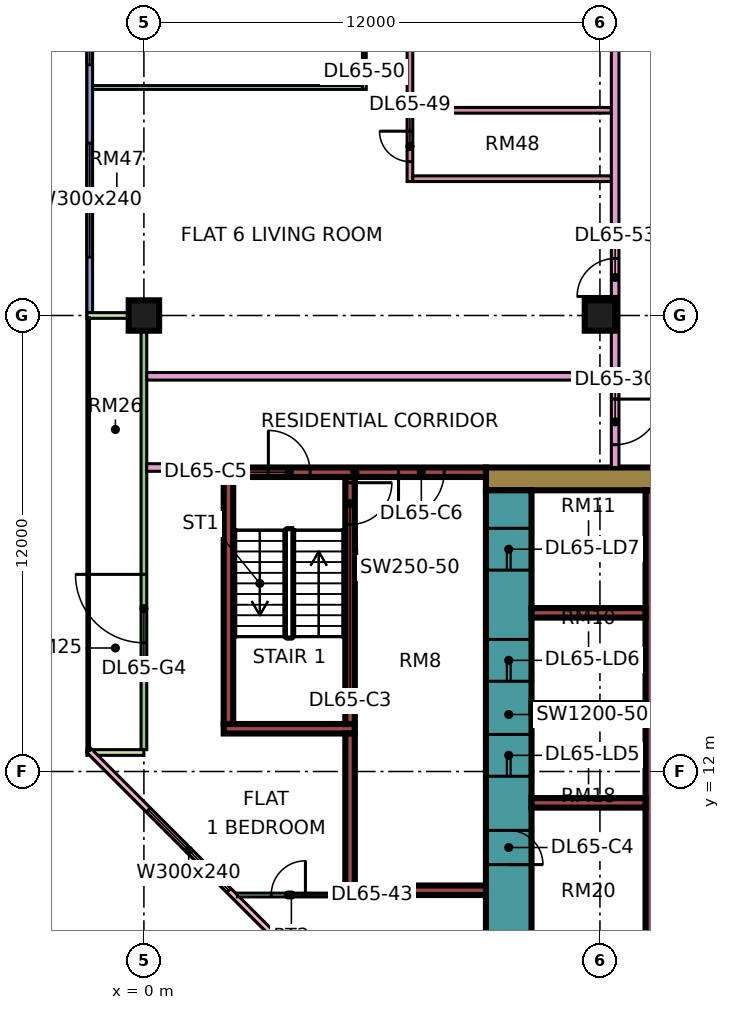
"""IFC4 building model, lengths in metres.
Left out: names, types, materials, properties, quantities, classifications, styles, units other than length and angle.
Written with IfcOpenShell. Run it as: python <this file> out.ifc"""

import sys

from ifc_helpers import new_model, si_unit, direction, frame, frame_2d, origin, origin_2d, place, context, subcontext, project, spatial, rectangle, extrude, element, fill, save


model = new_model("IFC4")
c1 = context("Model", 3, precision=1e-05, world=origin(), true_north=direction((0.0, 1.0)))
c2 = subcontext(c1, "Body", "Model", "MODEL_VIEW")
j1 = project(units=[si_unit("LENGTHUNIT", "METRE"), si_unit("PLANEANGLEUNIT", "RADIAN")], contexts=[c1])
p1 = place(None, origin())
s1 = spatial("IfcSite", under=j1, at=p1, CompositionType="ELEMENT")
p2 = place(p1, origin())
s2 = spatial("IfcBuilding", under=s1, at=p2, CompositionType="ELEMENT")
p3 = place(p2, frame((0.0, 0.0, 280.9)))
s3 = spatial("IfcBuildingStorey", under=s2, at=p3, CompositionType="ELEMENT", Elevation=280.9)
for number, where, z_axis, x_axis in (
    (1, (0.0, 24.0, 0.0), (0.0, 0.0, 1.0), (1.0, 0.0, 0.0)),
    (2, (12.0, 24.0, 0.0), (0.0, 0.0, 1.0), (1.0, 0.0, 0.0)),
):
    element("IfcColumn", number, at=place(p3, frame(where, z_axis=z_axis, x_axis=x_axis)), inside=s3, PredefinedType="COLUMN", context=c2, shape_type="SweptSolid", body=[
        extrude(rectangle(XDim=0.8, YDim=0.8, at=origin_2d()), origin(), (0.0, 0.0, 1.0), 3.75),
    ])
p4 = place(p3, frame((9.0, 19.7, 0.0), z_axis=(0.0, 0.0, 1.0), x_axis=(1.0, 0.0, 0.0)))
e3 = element("IfcWall", 3, at=p4, inside=s3, PredefinedType="SHEAR", context=c2, shape_type="SweptSolid", body=[
    extrude(rectangle(XDim=25.0, YDim=0.6, at=frame_2d((12.5, 0.0))), origin(), (0.0, 0.0, 1.0), 3.75),
])
p5 = place(p4, frame((19.1, 0.0, 0.0)))
e4 = element("IfcOpeningElement", 4, at=p5, cuts=e3, PredefinedType="OPENING", context=c2, shape_type="SweptSolid", body=[
    extrude(rectangle(XDim=1.8, YDim=2.4, at=frame_2d((0.9, 1.2))), frame((0.0, 0.31, 0.0), z_axis=(0.0, -1.0, 0.0), x_axis=(1.0, 0.0, 0.0)), (0.0, 0.0, 1.0), 0.62),
])
p6 = place(p3, frame((9.6, 7.6, 0.0), z_axis=(0.0, 0.0, 1.0), x_axis=(0.0, 1.0, 0.0)))
e5 = element("IfcWall", 5, at=p6, inside=s3, PredefinedType="SHEAR", context=c2, shape_type="SweptSolid", body=[
    extrude(rectangle(XDim=11.8, YDim=1.2, at=frame_2d((5.9, 0.0))), origin(), (0.0, 0.0, 1.0), 3.75),
])
p7 = place(p6, frame((4.275, 0.0, 0.0)))
e6 = element("IfcOpeningElement", 6, at=p7, cuts=e5, PredefinedType="OPENING", context=c2, shape_type="SweptSolid", body=[
    extrude(rectangle(XDim=1.1, YDim=2.2, at=frame_2d((0.55, 1.1))), frame((0.0, 0.61, 0.0), z_axis=(0.0, -1.0, 0.0), x_axis=(1.0, 0.0, 0.0)), (0.0, 0.0, 1.0), 1.22),
])
p8 = place(p6, frame((6.775, 0.0, 0.0)))
e7 = element("IfcOpeningElement", 7, at=p8, cuts=e5, PredefinedType="OPENING", context=c2, shape_type="SweptSolid", body=[
    extrude(rectangle(XDim=1.1, YDim=2.2, at=frame_2d((0.55, 1.1))), frame((0.0, 0.61, 0.0), z_axis=(0.0, -1.0, 0.0), x_axis=(1.0, 0.0, 0.0)), (0.0, 0.0, 1.0), 1.22),
])
p9 = place(p6, frame((9.7, 0.0, 0.0)))
e8 = element("IfcOpeningElement", 8, at=p9, cuts=e5, PredefinedType="OPENING", context=c2, shape_type="SweptSolid", body=[
    extrude(rectangle(XDim=1.1, YDim=2.2, at=frame_2d((0.55, 1.1))), frame((0.0, 0.61, 0.0), z_axis=(0.0, -1.0, 0.0), x_axis=(1.0, 0.0, 0.0)), (0.0, 0.0, 1.0), 1.22),
])
p10 = place(p6, frame((1.95, 0.0, 0.0)))
e9 = element("IfcOpeningElement", 9, at=p10, cuts=e5, PredefinedType="OPENING", context=c2, shape_type="SweptSolid", body=[
    extrude(rectangle(XDim=0.9, YDim=2.1, at=frame_2d((0.45, 1.05))), frame((0.0, 0.61, 0.0), z_axis=(0.0, -1.0, 0.0), x_axis=(1.0, 0.0, 0.0)), (0.0, 0.0, 1.0), 1.22),
])
p11 = place(p3, frame((13.325, 7.6, 0.0), z_axis=(0.0, 0.0, 1.0), x_axis=(0.0, 1.0, 0.0)))
e10 = element("IfcWall", 10, at=p11, inside=s3, PredefinedType="SHEAR", context=c2, shape_type="SweptSolid", body=[
    extrude(rectangle(XDim=11.8, YDim=0.25, at=frame_2d((5.9, 0.0))), origin(), (0.0, 0.0, 1.0), 3.75),
])
for number, where, z_axis, x_axis in (
    (11, (10.2, 11.175, 0.0), (0.0, 0.0, 1.0), (1.0, 0.0, 0.0)),
    (12, (10.2, 13.675, 0.0), (0.0, 0.0, 1.0), (1.0, 0.0, 0.0)),
    (13, (10.2, 16.175, 0.0), (0.0, 0.0, 1.0), (1.0, 0.0, 0.0)),
):
    element("IfcWall", number, at=place(p3, frame(where, z_axis=z_axis, x_axis=x_axis)), inside=s3, PredefinedType="SHEAR", context=c2, shape_type="SweptSolid", body=[
        extrude(rectangle(XDim=3.0, YDim=0.25, at=frame_2d((1.5, 0.0))), origin(), (0.0, 0.0, 1.0), 3.75),
    ])
p12 = place(p3, frame((2.1, 19.875, 0.0), z_axis=(0.0, 0.0, 1.0), x_axis=(1.0, 0.0, 0.0)))
e14 = element("IfcWall", 14, at=p12, inside=s3, PredefinedType="SHEAR", context=c2, shape_type="SweptSolid", body=[
    extrude(rectangle(XDim=6.9, YDim=0.25, at=frame_2d((3.45, 0.0))), origin(), (0.0, 0.0, 1.0), 3.75),
])
p13 = place(p12, frame((1.175, 0.0, 0.0)))
e15 = element("IfcOpeningElement", 15, at=p13, cuts=e14, PredefinedType="OPENING", context=c2, shape_type="SweptSolid", body=[
    extrude(rectangle(XDim=1.1, YDim=2.2, at=frame_2d((0.55, 1.1))), frame((0.0, 0.135, 0.0), z_axis=(0.0, -1.0, 0.0), x_axis=(1.0, 0.0, 0.0)), (0.0, 0.0, 1.0), 0.27),
])
p14 = place(p12, frame((4.6, 0.0, 0.0)))
e16 = element("IfcOpeningElement", 16, at=p14, cuts=e14, PredefinedType="OPENING", context=c2, shape_type="SweptSolid", body=[
    extrude(rectangle(XDim=1.2, YDim=2.2, at=frame_2d((0.6, 1.1))), frame((0.0, 0.135, 0.0), z_axis=(0.0, -1.0, 0.0), x_axis=(1.0, 0.0, 0.0)), (0.0, 0.0, 1.0), 0.27),
])
p15 = place(p3, frame((2.1, 13.125, 0.0), z_axis=(0.0, 0.0, 1.0), x_axis=(1.0, 0.0, 0.0)))
e17 = element("IfcWall", 17, at=p15, inside=s3, PredefinedType="SHEAR", context=c2, shape_type="SweptSolid", body=[
    extrude(rectangle(XDim=3.45, YDim=0.25, at=frame_2d((1.725, 0.0))), origin(), (0.0, 0.0, 1.0), 3.75),
])
p16 = place(p3, frame((2.225, 13.25, 0.0), z_axis=(0.0, 0.0, 1.0), x_axis=(0.0, 1.0, 0.0)))
e18 = element("IfcWall", 18, at=p16, inside=s3, PredefinedType="SHEAR", context=c2, shape_type="SweptSolid", body=[
    extrude(rectangle(XDim=6.5, YDim=0.25, at=frame_2d((3.25, 0.0))), origin(), (0.0, 0.0, 1.0), 3.75),
])
p17 = place(p3, frame((5.425, 13.25, 0.0), z_axis=(0.0, 0.0, 1.0), x_axis=(0.0, 1.0, 0.0)))
e19 = element("IfcWall", 19, at=p17, inside=s3, PredefinedType="SHEAR", context=c2, shape_type="SweptSolid", body=[
    extrude(rectangle(XDim=6.5, YDim=0.25, at=frame_2d((3.25, 0.0))), origin(), (0.0, 0.0, 1.0), 3.75),
])
p18 = place(p17, frame((5.25, 0.0, 0.0)))
e20 = element("IfcOpeningElement", 20, at=p18, cuts=e19, PredefinedType="OPENING", context=c2, shape_type="SweptSolid", body=[
    extrude(rectangle(XDim=1.1, YDim=2.2, at=frame_2d((0.55, 1.1))), frame((0.0, 0.135, 0.0), z_axis=(0.0, -1.0, 0.0), x_axis=(1.0, 0.0, 0.0)), (0.0, 0.0, 1.0), 0.27),
])
p19 = place(p3, frame((5.3, 8.875, 0.0), z_axis=(0.0, 0.0, 1.0), x_axis=(1.0, 0.0, 0.0)))
e21 = element("IfcWall", 21, at=p19, inside=s3, PredefinedType="SHEAR", context=c2, shape_type="SweptSolid", body=[
    extrude(rectangle(XDim=3.7, YDim=0.25, at=frame_2d((1.85, 0.0))), origin(), (0.0, 0.0, 1.0), 3.75),
])
p20 = place(p3, frame((5.425, 9.0, 0.0), z_axis=(0.0, 0.0, 1.0), x_axis=(0.0, 1.0, 0.0)))
e22 = element("IfcWall", 22, at=p20, inside=s3, PredefinedType="SHEAR", context=c2, shape_type="SweptSolid", body=[
    extrude(rectangle(XDim=4.0, YDim=0.25, at=frame_2d((2.0, 0.0))), origin(), (0.0, 0.0, 1.0), 3.75),
])
p21 = place(p3, frame((-1.425, 35.925, 0.0), z_axis=(0.0, 0.0, 1.0), x_axis=(0.0, -1.0, 0.0)))
e23 = element("IfcWall", 23, at=p21, inside=s3, PredefinedType="SOLIDWALL", context=c2, shape_type="SweptSolid", body=[
    extrude(rectangle(XDim=11.85, YDim=0.15, at=frame_2d((5.925, 0.0))), origin(), (0.0, 0.0, 1.0), 3.35),
])
p22 = place(p21, frame((0.562, 0.0, 0.45)))
e24 = element("IfcOpeningElement", 24, at=p22, cuts=e23, PredefinedType="OPENING", context=c2, shape_type="SweptSolid", body=[
    extrude(rectangle(XDim=1.8, YDim=2.4, at=frame_2d((0.9, 1.2))), frame((0.0, 0.085, 0.0), z_axis=(0.0, -1.0, 0.0), x_axis=(1.0, 0.0, 0.0)), (0.0, 0.0, 1.0), 0.17),
])
p23 = place(p21, frame((3.525, 0.0, 0.45)))
e25 = element("IfcOpeningElement", 25, at=p23, cuts=e23, PredefinedType="OPENING", context=c2, shape_type="SweptSolid", body=[
    extrude(rectangle(XDim=1.8, YDim=2.4, at=frame_2d((0.9, 1.2))), frame((0.0, 0.085, 0.0), z_axis=(0.0, -1.0, 0.0), x_axis=(1.0, 0.0, 0.0)), (0.0, 0.0, 1.0), 0.17),
])
p24 = place(p21, frame((7.387, 0.0, 0.45)))
e26 = element("IfcOpeningElement", 26, at=p24, cuts=e23, PredefinedType="OPENING", context=c2, shape_type="SweptSolid", body=[
    extrude(rectangle(XDim=3.0, YDim=2.4, at=frame_2d((1.5, 1.2))), frame((0.0, 0.085, 0.0), z_axis=(0.0, -1.0, 0.0), x_axis=(1.0, 0.0, 0.0)), (0.0, 0.0, 1.0), 0.17),
])
p25 = place(p3, frame((0.0, 23.925, 0.0), z_axis=(0.0, 0.0, 1.0), x_axis=(0.0, -1.0, 0.0)))
e27 = element("IfcWall", 27, at=p25, inside=s3, PredefinedType="SOLIDWALL", context=c2, shape_type="SweptSolid", body=[
    extrude(rectangle(XDim=11.35, YDim=0.15, at=frame_2d((5.675, 0.0))), origin(), (0.0, 0.0, 1.0), 3.35),
])
p26 = place(p25, frame((6.738, 0.0, 0.0)))
e28 = element("IfcOpeningElement", 28, at=p26, cuts=e27, PredefinedType="OPENING", context=c2, shape_type="SweptSolid", body=[
    extrude(rectangle(XDim=1.8, YDim=2.4, at=frame_2d((0.9, 1.2))), frame((0.0, 0.085, 0.0), z_axis=(0.0, -1.0, 0.0), x_axis=(1.0, 0.0, 0.0)), (0.0, 0.0, 1.0), 0.17),
])
for number, where, z_axis, x_axis in (
    (29, (-1.5, 24.0, 0.0), (0.0, 0.0, 1.0), (1.0, 0.0, 0.0)),
    (30, (-1.5, 12.5, 0.0), (0.0, 0.0, 1.0), (1.0, 0.0, 0.0)),
):
    element("IfcWall", number, at=place(p3, frame(where, z_axis=z_axis, x_axis=x_axis)), inside=s3, PredefinedType="SOLIDWALL", context=c2, shape_type="SweptSolid", body=[
        extrude(rectangle(XDim=1.5, YDim=0.15, at=frame_2d((0.75, 0.0))), origin(), (0.0, 0.0, 1.0), 3.35),
    ])
p27 = place(p3, frame((-1.447, 12.553, 0.0), z_axis=(0.0, 0.0, 1.0), x_axis=(0.707106781187, -0.707106781187, 0.0)))
e31 = element("IfcWall", 31, at=p27, inside=s3, PredefinedType="SOLIDWALL", context=c2, shape_type="SweptSolid", body=[
    extrude(rectangle(XDim=19.799, YDim=0.15, at=frame_2d((9.899, 0.0))), origin(), (0.0, 0.0, 1.0), 3.35),
])
p28 = place(p27, frame((2.212, 0.0, 0.45)))
e32 = element("IfcOpeningElement", 32, at=p28, cuts=e31, PredefinedType="OPENING", context=c2, shape_type="SweptSolid", body=[
    extrude(rectangle(XDim=3.0, YDim=2.4, at=frame_2d((1.5, 1.2))), frame((0.0, 0.085, 0.0), z_axis=(0.0, -1.0, 0.0), x_axis=(1.0, 0.0, 0.0)), (0.0, 0.0, 1.0), 0.17),
])
p29 = place(p27, frame((10.216, 0.0, 0.45)))
e33 = element("IfcOpeningElement", 33, at=p29, cuts=e31, PredefinedType="OPENING", context=c2, shape_type="SweptSolid", body=[
    extrude(rectangle(XDim=3.0, YDim=2.4, at=frame_2d((1.5, 1.2))), frame((0.0, 0.085, 0.0), z_axis=(0.0, -1.0, 0.0), x_axis=(1.0, 0.0, 0.0)), (0.0, 0.0, 1.0), 0.17),
])
p30 = place(p3, frame((-1.35, 30.0, 0.0), z_axis=(0.0, 0.0, 1.0), x_axis=(1.0, 0.0, 0.0)))
e34 = element("IfcWall", 34, at=p30, inside=s3, PredefinedType="PARTITIONING", context=c2, shape_type="SweptSolid", body=[
    extrude(rectangle(XDim=7.1, YDim=0.1, at=frame_2d((3.55, 0.0))), origin(), (0.0, 0.0, 1.0), 3.35),
])
p31 = place(p3, frame((0.074, 20.0, 0.0), z_axis=(0.0, 0.0, 1.0), x_axis=(1.0, 0.0, 0.0)))
e35 = element("IfcWall", 35, at=p31, inside=s3, PredefinedType="PARTITIONING", context=c2, shape_type="SweptSolid", body=[
    extrude(rectangle(XDim=2.026, YDim=0.2, at=frame_2d((1.013, 0.0))), origin(), (0.0, 0.0, 1.0), 3.35),
])
p32 = place(p3, frame((0.074, 22.4, 0.0), z_axis=(0.0, 0.0, 1.0), x_axis=(1.0, 0.0, 0.0)))
e36 = element("IfcWall", 36, at=p32, inside=s3, PredefinedType="PARTITIONING", context=c2, shape_type="SweptSolid", body=[
    extrude(rectangle(XDim=12.226, YDim=0.2, at=frame_2d((6.113, 0.0))), origin(), (0.0, 0.0, 1.0), 3.35),
])
p33 = place(p3, frame((2.461, 8.75, 0.0), z_axis=(0.0, 0.0, 1.0), x_axis=(1.0, 0.0, 0.0)))
e37 = element("IfcWall", 37, at=p33, inside=s3, PredefinedType="PARTITIONING", context=c2, shape_type="SweptSolid", body=[
    extrude(rectangle(XDim=2.839, YDim=0.1, at=frame_2d((1.419, 0.0))), origin(), (0.0, 0.0, 1.0), 3.35),
])
p34 = place(p33, frame((0.889, 0.0, 0.0)))
e38 = element("IfcOpeningElement", 38, at=p34, cuts=e37, PredefinedType="OPENING", context=c2, shape_type="SweptSolid", body=[
    extrude(rectangle(XDim=0.9, YDim=2.1, at=frame_2d((0.45, 1.05))), frame((0.0, 0.06, 0.0), z_axis=(0.0, -1.0, 0.0), x_axis=(1.0, 0.0, 0.0)), (0.0, 0.0, 1.0), 0.12),
])
p35 = place(p3, frame((5.8, 29.95, 0.0), z_axis=(0.0, 0.0, 1.0), x_axis=(0.0, 1.0, 0.0)))
e39 = element("IfcWall", 39, at=p35, inside=s3, PredefinedType="PARTITIONING", context=c2, shape_type="SweptSolid", body=[
    extrude(rectangle(XDim=5.95, YDim=0.1, at=frame_2d((2.975, 0.0))), origin(), (0.0, 0.0, 1.0), 3.35),
])
p36 = place(p35, frame((1.1, 0.0, 0.0)))
e40 = element("IfcOpeningElement", 40, at=p36, cuts=e39, PredefinedType="OPENING", context=c2, shape_type="SweptSolid", body=[
    extrude(rectangle(XDim=0.9, YDim=2.1, at=frame_2d((0.45, 1.05))), frame((0.0, 0.06, 0.0), z_axis=(0.0, -1.0, 0.0), x_axis=(1.0, 0.0, 0.0)), (0.0, 0.0, 1.0), 0.12),
])
p37 = place(p35, frame((4.1, 0.0, 0.0)))
e41 = element("IfcOpeningElement", 41, at=p37, cuts=e39, PredefinedType="OPENING", context=c2, shape_type="SweptSolid", body=[
    extrude(rectangle(XDim=0.9, YDim=2.1, at=frame_2d((0.45, 1.05))), frame((0.0, 0.06, 0.0), z_axis=(0.0, -1.0, 0.0), x_axis=(1.0, 0.0, 0.0)), (0.0, 0.0, 1.0), 0.12),
])
p38 = place(p3, frame((7.0, 27.525, 0.0), z_axis=(0.0, 0.0, 1.0), x_axis=(0.0, 1.0, 0.0)))
e42 = element("IfcWall", 42, at=p38, inside=s3, PredefinedType="PARTITIONING", context=c2, shape_type="SweptSolid", body=[
    extrude(rectangle(XDim=8.375, YDim=0.15, at=frame_2d((4.188, 0.0))), origin(), (0.0, 0.0, 1.0), 3.35),
])
p39 = place(p38, frame((0.525, 0.0, 0.0)))
e43 = element("IfcOpeningElement", 43, at=p39, cuts=e42, PredefinedType="OPENING", context=c2, shape_type="SweptSolid", body=[
    extrude(rectangle(XDim=0.8, YDim=2.1, at=frame_2d((0.4, 1.05))), frame((0.0, 0.085, 0.0), z_axis=(0.0, -1.0, 0.0), x_axis=(1.0, 0.0, 0.0)), (0.0, 0.0, 1.0), 0.17),
])
p40 = place(p38, frame((4.725, 0.0, 0.0)))
e44 = element("IfcOpeningElement", 44, at=p40, cuts=e42, PredefinedType="OPENING", context=c2, shape_type="SweptSolid", body=[
    extrude(rectangle(XDim=0.9, YDim=2.1, at=frame_2d((0.45, 1.05))), frame((0.0, 0.085, 0.0), z_axis=(0.0, -1.0, 0.0), x_axis=(1.0, 0.0, 0.0)), (0.0, 0.0, 1.0), 0.17),
])
for number, where, z_axis, x_axis in (
    (45, (7.075, 27.6, 0.0), (0.0, 0.0, 1.0), (1.0, 0.0, 0.0)),
    (46, (7.075, 29.4, 0.0), (0.0, 0.0, 1.0), (1.0, 0.0, 0.0)),
):
    element("IfcWall", number, at=place(p3, frame(where, z_axis=z_axis, x_axis=x_axis)), inside=s3, PredefinedType="PARTITIONING", context=c2, shape_type="SweptSolid", body=[
        extrude(rectangle(XDim=5.225, YDim=0.15, at=frame_2d((2.613, 0.0))), origin(), (0.0, 0.0, 1.0), 3.35),
    ])
p41 = place(p3, frame((12.4, 20.0, 0.0), z_axis=(0.0, 0.0, 1.0), x_axis=(0.0, 1.0, 0.0)))
e47 = element("IfcWall", 47, at=p41, inside=s3, PredefinedType="PARTITIONING", context=c2, shape_type="SweptSolid", body=[
    extrude(rectangle(XDim=33.926, YDim=0.2, at=frame_2d((16.963, 0.0))), origin(), (0.0, 0.0, 1.0), 3.35),
])
p42 = place(p41, frame((25.8, 0.0, 0.0)))
e48 = element("IfcOpeningElement", 48, at=p42, cuts=e47, PredefinedType="OPENING", context=c2, shape_type="SweptSolid", body=[
    extrude(rectangle(XDim=1.0, YDim=2.1, at=frame_2d((0.5, 1.05))), frame((0.0, 0.11, 0.0), z_axis=(0.0, -1.0, 0.0), x_axis=(1.0, 0.0, 0.0)), (0.0, 0.0, 1.0), 0.22),
])
p43 = place(p41, frame((0.6, 0.0, 0.0)))
e49 = element("IfcOpeningElement", 49, at=p43, cuts=e47, PredefinedType="OPENING", context=c2, shape_type="SweptSolid", body=[
    extrude(rectangle(XDim=1.2, YDim=2.1, at=frame_2d((0.6, 1.05))), frame((0.0, 0.11, 0.0), z_axis=(0.0, -1.0, 0.0), x_axis=(1.0, 0.0, 0.0)), (0.0, 0.0, 1.0), 0.22),
])
p44 = place(p41, frame((4.5, 0.0, 0.0)))
e50 = element("IfcOpeningElement", 50, at=p44, cuts=e47, PredefinedType="OPENING", context=c2, shape_type="SweptSolid", body=[
    extrude(rectangle(XDim=1.0, YDim=2.1, at=frame_2d((0.5, 1.05))), frame((0.0, 0.11, 0.0), z_axis=(0.0, -1.0, 0.0), x_axis=(1.0, 0.0, 0.0)), (0.0, 0.0, 1.0), 0.22),
])
p45 = place(p23, origin())
e51 = element("IfcWindow", 51, at=p45, inside=s3, PartitioningType="SINGLE_PANEL", PredefinedType="WINDOW", context=c2, shape_type="SweptSolid", body=[
    extrude(rectangle(XDim=1.8, YDim=2.4, at=frame_2d((0.9, 1.2))), frame((0.0, 0.03, 0.0), z_axis=(0.0, -1.0, 0.0), x_axis=(1.0, 0.0, 0.0)), (0.0, 0.0, 1.0), 0.06),
])
fill(e25, e51)
p46 = place(p24, origin())
e52 = element("IfcWindow", 52, at=p46, inside=s3, PartitioningType="SINGLE_PANEL", PredefinedType="WINDOW", context=c2, shape_type="SweptSolid", body=[
    extrude(rectangle(XDim=3.0, YDim=2.4, at=frame_2d((1.5, 1.2))), frame((0.0, 0.03, 0.0), z_axis=(0.0, -1.0, 0.0), x_axis=(1.0, 0.0, 0.0)), (0.0, 0.0, 1.0), 0.06),
])
fill(e26, e52)
p47 = place(p26, frame((1.8, 0.0, 0.0), z_axis=(0.0, 0.0, 1.0), x_axis=(-1.0, 0.0, 0.0)))
e53 = element("IfcDoor", 53, at=p47, inside=s3, OperationType="DOUBLE_DOOR_SINGLE_SWING", PredefinedType="DOOR", context=c2, shape_type="SweptSolid", body=[
    extrude(rectangle(XDim=1.8, YDim=2.4, at=frame_2d((0.9, 1.2))), frame((0.0, 0.025, 0.0), z_axis=(0.0, -1.0, 0.0), x_axis=(1.0, 0.0, 0.0)), (0.0, 0.0, 1.0), 0.05),
])
fill(e28, e53)
p48 = place(p28, origin())
e54 = element("IfcWindow", 54, at=p48, inside=s3, PartitioningType="SINGLE_PANEL", PredefinedType="WINDOW", context=c2, shape_type="SweptSolid", body=[
    extrude(rectangle(XDim=3.0, YDim=2.4, at=frame_2d((1.5, 1.2))), frame((0.0, 0.03, 0.0), z_axis=(0.0, -1.0, 0.0), x_axis=(1.0, 0.0, 0.0)), (0.0, 0.0, 1.0), 0.06),
])
fill(e32, e54)
p49 = place(p7, origin())
e55 = element("IfcDoor", 55, at=p49, inside=s3, OperationType="DOUBLE_DOOR_SLIDING", PredefinedType="DOOR", context=c2, shape_type="SweptSolid", body=[
    extrude(rectangle(XDim=1.1, YDim=2.2, at=frame_2d((0.55, 1.1))), frame((0.0, 0.025, 0.0), z_axis=(0.0, -1.0, 0.0), x_axis=(1.0, 0.0, 0.0)), (0.0, 0.0, 1.0), 0.05),
])
fill(e6, e55)
p50 = place(p8, origin())
e56 = element("IfcDoor", 56, at=p50, inside=s3, OperationType="DOUBLE_DOOR_SLIDING", PredefinedType="DOOR", context=c2, shape_type="SweptSolid", body=[
    extrude(rectangle(XDim=1.1, YDim=2.2, at=frame_2d((0.55, 1.1))), frame((0.0, 0.025, 0.0), z_axis=(0.0, -1.0, 0.0), x_axis=(1.0, 0.0, 0.0)), (0.0, 0.0, 1.0), 0.05),
])
fill(e7, e56)
p51 = place(p9, origin())
e57 = element("IfcDoor", 57, at=p51, inside=s3, OperationType="DOUBLE_DOOR_SLIDING", PredefinedType="DOOR", context=c2, shape_type="SweptSolid", body=[
    extrude(rectangle(XDim=1.1, YDim=2.2, at=frame_2d((0.55, 1.1))), frame((0.0, 0.025, 0.0), z_axis=(0.0, -1.0, 0.0), x_axis=(1.0, 0.0, 0.0)), (0.0, 0.0, 1.0), 0.05),
])
fill(e8, e57)
p52 = place(p18, origin())
e58 = element("IfcDoor", 58, at=p52, inside=s3, OperationType="SINGLE_SWING_RIGHT", PredefinedType="DOOR", context=c2, shape_type="SweptSolid", body=[
    extrude(rectangle(XDim=1.1, YDim=2.2, at=frame_2d((0.55, 1.1))), frame((0.0, 0.025, 0.0), z_axis=(0.0, -1.0, 0.0), x_axis=(1.0, 0.0, 0.0)), (0.0, 0.0, 1.0), 0.05),
])
fill(e20, e58)
p53 = place(p10, frame((0.9, 0.0, 0.0), z_axis=(0.0, 0.0, 1.0), x_axis=(-1.0, 0.0, 0.0)))
e59 = element("IfcDoor", 59, at=p53, inside=s3, OperationType="SINGLE_SWING_LEFT", PredefinedType="DOOR", context=c2, shape_type="SweptSolid", body=[
    extrude(rectangle(XDim=0.9, YDim=2.1, at=frame_2d((0.45, 1.05))), frame((0.0, 0.025, 0.0), z_axis=(0.0, -1.0, 0.0), x_axis=(1.0, 0.0, 0.0)), (0.0, 0.0, 1.0), 0.05),
])
fill(e9, e59)
p54 = place(p13, origin())
e60 = element("IfcDoor", 60, at=p54, inside=s3, OperationType="SINGLE_SWING_LEFT", PredefinedType="DOOR", context=c2, shape_type="SweptSolid", body=[
    extrude(rectangle(XDim=1.1, YDim=2.2, at=frame_2d((0.55, 1.1))), frame((0.0, 0.025, 0.0), z_axis=(0.0, -1.0, 0.0), x_axis=(1.0, 0.0, 0.0)), (0.0, 0.0, 1.0), 0.05),
])
fill(e15, e60)
p55 = place(p14, frame((1.2, 0.0, 0.0), z_axis=(0.0, 0.0, 1.0), x_axis=(-1.0, 0.0, 0.0)))
e61 = element("IfcDoor", 61, at=p55, inside=s3, OperationType="SINGLE_SWING_LEFT", PredefinedType="DOOR", context=c2, shape_type="SweptSolid", body=[
    extrude(rectangle(XDim=1.2, YDim=2.2, at=frame_2d((0.6, 1.1))), frame((0.0, 0.025, 0.0), z_axis=(0.0, -1.0, 0.0), x_axis=(1.0, 0.0, 0.0)), (0.0, 0.0, 1.0), 0.05),
])
fill(e16, e61)
p56 = place(p43, origin())
e62 = element("IfcDoor", 62, at=p56, inside=s3, OperationType="SINGLE_SWING_RIGHT", PredefinedType="DOOR", context=c2, shape_type="SweptSolid", body=[
    extrude(rectangle(XDim=1.2, YDim=2.1, at=frame_2d((0.6, 1.05))), frame((0.0, 0.025, 0.0), z_axis=(0.0, -1.0, 0.0), x_axis=(1.0, 0.0, 0.0)), (0.0, 0.0, 1.0), 0.05),
])
fill(e49, e62)
p57 = place(p34, frame((0.9, 0.0, 0.0), z_axis=(0.0, 0.0, 1.0), x_axis=(-1.0, 0.0, 0.0)))
e63 = element("IfcDoor", 63, at=p57, inside=s3, OperationType="SINGLE_SWING_RIGHT", PredefinedType="DOOR", context=c2, shape_type="SweptSolid", body=[
    extrude(rectangle(XDim=0.9, YDim=2.1, at=frame_2d((0.45, 1.05))), frame((0.0, 0.025, 0.0), z_axis=(0.0, -1.0, 0.0), x_axis=(1.0, 0.0, 0.0)), (0.0, 0.0, 1.0), 0.05),
])
fill(e38, e63)
p58 = place(p39, frame((0.8, 0.0, 0.0), z_axis=(0.0, 0.0, 1.0), x_axis=(-1.0, 0.0, 0.0)))
e64 = element("IfcDoor", 64, at=p58, inside=s3, OperationType="SINGLE_SWING_RIGHT", PredefinedType="DOOR", context=c2, shape_type="SweptSolid", body=[
    extrude(rectangle(XDim=0.8, YDim=2.1, at=frame_2d((0.4, 1.05))), frame((0.0, 0.025, 0.0), z_axis=(0.0, -1.0, 0.0), x_axis=(1.0, 0.0, 0.0)), (0.0, 0.0, 1.0), 0.05),
])
fill(e43, e64)
p59 = place(p44, origin())
e65 = element("IfcDoor", 65, at=p59, inside=s3, OperationType="SINGLE_SWING_LEFT", PredefinedType="DOOR", context=c2, shape_type="SweptSolid", body=[
    extrude(rectangle(XDim=1.0, YDim=2.1, at=frame_2d((0.5, 1.05))), frame((0.0, 0.025, 0.0), z_axis=(0.0, -1.0, 0.0), x_axis=(1.0, 0.0, 0.0)), (0.0, 0.0, 1.0), 0.05),
])
fill(e50, e65)
save(model, sys.argv[1])
